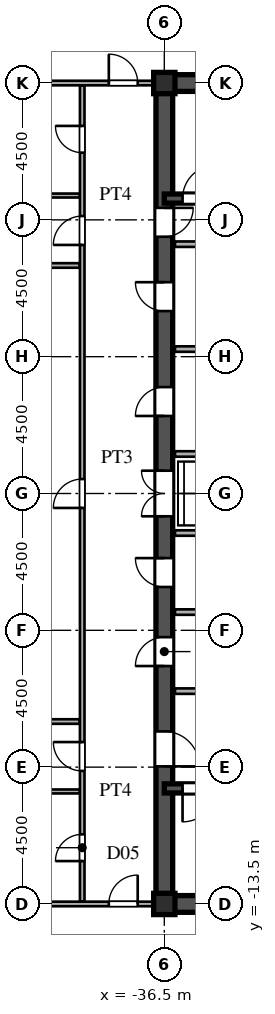
"""IFC4 building model, lengths in metres.
Left out: names, types, materials, properties, quantities, classifications, styles, units other than length and angle.
Written with IfcOpenShell. Run it as: python <this file> out.ifc"""

import sys

from ifc_helpers import new_model, si_unit, direction, frame, frame_2d, origin, origin_2d, place, context, subcontext, project, spatial, rectangle, i_section, extrude, source, transform, mapped, element, fill, save


model = new_model("IFC4")
c1 = context("Model", 3, precision=1e-05, world=origin(), true_north=direction((0.0, 1.0)))
c2 = subcontext(c1, "Body", "Model", "MODEL_VIEW")
j1 = project(units=[si_unit("LENGTHUNIT", "METRE"), si_unit("PLANEANGLEUNIT", "RADIAN")], contexts=[c1])
p1 = place(None, origin())
s1 = spatial("IfcSite", under=j1, at=p1, CompositionType="ELEMENT")
p2 = place(p1, origin())
s2 = spatial("IfcBuilding", under=s1, at=p2, CompositionType="ELEMENT")
p3 = place(p2, frame((0.0, 0.0, 135.6)))
s3 = spatial("IfcBuildingStorey", under=s2, at=p3, CompositionType="ELEMENT", Elevation=135.6)
m1 = source(origin(), c2, "Body", "SweptSolid", [
    extrude(i_section(OverallWidth=0.7, OverallDepth=0.7, WebThickness=0.028, FlangeThickness=0.045, at=origin_2d()), origin(), (0.0, 0.0, 1.0), 4.8),
])
for number, where, z_axis, x_axis in (
    (1, (-36.5, -13.5, 0.0), (0.0, 0.0, 1.0), (1.0, 0.0, 0.0)),
    (2, (-36.5, 13.5, 0.0), (0.0, 0.0, 1.0), (1.0, 0.0, 0.0)),
):
    element("IfcColumn", number, at=place(p3, frame(where, z_axis=z_axis, x_axis=x_axis)), inside=s3, PredefinedType="COLUMN", context=c2, shape_type="MappedRepresentation", body=[
        mapped(m1, transform((0.0, 0.0, 0.0), scale=1.0)),
    ])
for number, where, z_axis, x_axis in (
    (3, (-36.5, -13.5, 0.0), (0.0, 0.0, 1.0), (1.0, 0.0, 0.0)),
    (4, (-36.5, 13.5, 0.0), (0.0, 0.0, 1.0), (1.0, 0.0, 0.0)),
):
    element("IfcWall", number, at=place(p3, frame(where, z_axis=z_axis, x_axis=x_axis)), inside=s3, PredefinedType="SHEAR", context=c2, shape_type="SweptSolid", body=[
        extrude(rectangle(XDim=9.0, YDim=0.55, at=frame_2d((4.5, 0.0))), origin(), (0.0, 0.0, 1.0), 4.58),
    ])
p4 = place(p3, frame((-36.5, -13.65, 0.0), z_axis=(0.0, 0.0, 1.0), x_axis=(0.0, 1.0, 0.0)))
e5 = element("IfcWall", 5, at=p4, inside=s3, PredefinedType="SHEAR", context=c2, shape_type="SweptSolid", body=[
    extrude(rectangle(XDim=7.15, YDim=0.55, at=frame_2d((3.575, 0.0))), origin(), (0.0, 0.0, 1.0), 4.58),
])
p5 = place(p4, frame((4.675, 0.0, 0.0)))
e6 = element("IfcOpeningElement", 6, at=p5, cuts=e5, PredefinedType="OPENING", context=c2, shape_type="SweptSolid", body=[
    extrude(rectangle(XDim=1.15, YDim=2.2, at=frame_2d((0.575, 1.1))), frame((0.0, 0.285, 0.0), z_axis=(0.0, -1.0, 0.0), x_axis=(1.0, 0.0, 0.0)), (0.0, 0.0, 1.0), 0.57),
])
p6 = place(p3, frame((-36.5, -1.3, 0.0), z_axis=(0.0, 0.0, 1.0), x_axis=(0.0, 1.0, 0.0)))
e7 = element("IfcWall", 7, at=p6, inside=s3, PredefinedType="SHEAR", context=c2, shape_type="SweptSolid", body=[
    extrude(rectangle(XDim=2.6, YDim=0.55, at=frame_2d((1.3, 0.0))), origin(), (0.0, 0.0, 1.0), 4.58),
])
p7 = place(p6, frame((0.55, 0.0, 0.0)))
e8 = element("IfcOpeningElement", 8, at=p7, cuts=e7, PredefinedType="OPENING", context=c2, shape_type="SweptSolid", body=[
    extrude(rectangle(XDim=1.5, YDim=2.3, at=frame_2d((0.75, 1.15))), frame((0.0, 0.285, 0.0), z_axis=(0.0, -1.0, 0.0), x_axis=(1.0, 0.0, 0.0)), (0.0, 0.0, 1.0), 0.57),
])
p8 = place(p3, frame((-36.5, 8.2, 0.0), z_axis=(0.0, 0.0, 1.0), x_axis=(0.0, 1.0, 0.0)))
e9 = element("IfcWall", 9, at=p8, inside=s3, PredefinedType="SHEAR", context=c2, shape_type="SweptSolid", body=[
    extrude(rectangle(XDim=5.45, YDim=0.55, at=frame_2d((2.725, 0.0))), origin(), (0.0, 0.0, 1.0), 4.58),
])
p9 = place(p8, frame((0.245, 0.0, 0.0)))
e10 = element("IfcOpeningElement", 10, at=p9, cuts=e9, PredefinedType="OPENING", context=c2, shape_type="SweptSolid", body=[
    extrude(rectangle(XDim=0.95, YDim=2.15, at=frame_2d((0.475, 1.075))), frame((0.0, 0.285, 0.0), z_axis=(0.0, -1.0, 0.0), x_axis=(1.0, 0.0, 0.0)), (0.0, 0.0, 1.0), 0.57),
])
p10 = place(p3, frame((-36.5, -6.5, 0.0), z_axis=(0.0, 0.0, 1.0), x_axis=(0.0, 1.0, 0.0)))
e11 = element("IfcWall", 11, at=p10, inside=s3, PredefinedType="SHEAR", context=c2, shape_type="SweptSolid", body=[
    extrude(rectangle(XDim=2.6, YDim=0.55, at=frame_2d((1.3, 0.0))), origin(), (0.0, 0.0, 1.0), 4.58),
])
p11 = place(p10, frame((0.825, 0.0, 0.0)))
e12 = element("IfcOpeningElement", 12, at=p11, cuts=e11, PredefinedType="OPENING", context=c2, shape_type="SweptSolid", body=[
    extrude(rectangle(XDim=0.95, YDim=2.15, at=frame_2d((0.475, 1.075))), frame((0.0, 0.285, 0.0), z_axis=(0.0, -1.0, 0.0), x_axis=(1.0, 0.0, 0.0)), (0.0, 0.0, 1.0), 0.57),
])
p12 = place(p3, frame((-36.5, -3.9, 0.0), z_axis=(0.0, 0.0, 1.0), x_axis=(0.0, 1.0, 0.0)))
e13 = element("IfcWall", 13, at=p12, inside=s3, PredefinedType="SHEAR", context=c2, shape_type="SweptSolid", body=[
    extrude(rectangle(XDim=2.6, YDim=0.55, at=frame_2d((1.3, 0.0))), origin(), (0.0, 0.0, 1.0), 4.58),
])
p13 = place(p12, frame((0.825, 0.0, 0.0)))
e14 = element("IfcOpeningElement", 14, at=p13, cuts=e13, PredefinedType="OPENING", context=c2, shape_type="SweptSolid", body=[
    extrude(rectangle(XDim=0.95, YDim=2.15, at=frame_2d((0.475, 1.075))), frame((0.0, 0.285, 0.0), z_axis=(0.0, -1.0, 0.0), x_axis=(1.0, 0.0, 0.0)), (0.0, 0.0, 1.0), 0.57),
])
p14 = place(p3, frame((-36.5, 1.3, 0.0), z_axis=(0.0, 0.0, 1.0), x_axis=(0.0, 1.0, 0.0)))
e15 = element("IfcWall", 15, at=p14, inside=s3, PredefinedType="SHEAR", context=c2, shape_type="SweptSolid", body=[
    extrude(rectangle(XDim=3.45, YDim=0.55, at=frame_2d((1.725, 0.0))), origin(), (0.0, 0.0, 1.0), 4.58),
])
p15 = place(p14, frame((1.25, 0.0, 0.0)))
e16 = element("IfcOpeningElement", 16, at=p15, cuts=e15, PredefinedType="OPENING", context=c2, shape_type="SweptSolid", body=[
    extrude(rectangle(XDim=0.95, YDim=2.15, at=frame_2d((0.475, 1.075))), frame((0.0, 0.285, 0.0), z_axis=(0.0, -1.0, 0.0), x_axis=(1.0, 0.0, 0.0)), (0.0, 0.0, 1.0), 0.57),
])
p16 = place(p3, frame((-36.5, 4.75, 0.0), z_axis=(0.0, 0.0, 1.0), x_axis=(0.0, 1.0, 0.0)))
e17 = element("IfcWall", 17, at=p16, inside=s3, PredefinedType="SHEAR", context=c2, shape_type="SweptSolid", body=[
    extrude(rectangle(XDim=3.45, YDim=0.55, at=frame_2d((1.725, 0.0))), origin(), (0.0, 0.0, 1.0), 4.58),
])
p17 = place(p16, frame((1.25, 0.0, 0.0)))
e18 = element("IfcOpeningElement", 18, at=p17, cuts=e17, PredefinedType="OPENING", context=c2, shape_type="SweptSolid", body=[
    extrude(rectangle(XDim=0.95, YDim=2.15, at=frame_2d((0.475, 1.075))), frame((0.0, 0.285, 0.0), z_axis=(0.0, -1.0, 0.0), x_axis=(1.0, 0.0, 0.0)), (0.0, 0.0, 1.0), 0.57),
])
p18 = place(p3, frame((-36.5, -9.7, 0.0), z_axis=(0.0, 0.0, 1.0), x_axis=(1.0, 0.0, 0.0)))
e19 = element("IfcWall", 19, at=p18, inside=s3, PredefinedType="SHEAR", context=c2, shape_type="SweptSolid", body=[
    extrude(rectangle(XDim=9.0, YDim=0.3, at=frame_2d((4.5, 0.0))), origin(), (0.0, 0.0, 1.0), 4.58),
])
p19 = place(p18, frame((0.6, 0.0, 0.0)))
e20 = element("IfcOpeningElement", 20, at=p19, cuts=e19, PredefinedType="OPENING", context=c2, shape_type="SweptSolid", body=[
    extrude(rectangle(XDim=1.1, YDim=2.2, at=frame_2d((0.55, 1.1))), frame((0.0, 0.16, 0.0), z_axis=(0.0, -1.0, 0.0), x_axis=(1.0, 0.0, 0.0)), (0.0, 0.0, 1.0), 0.32),
])
p20 = place(p3, frame((-36.5, 9.7, 0.0), z_axis=(0.0, 0.0, 1.0), x_axis=(1.0, 0.0, 0.0)))
e21 = element("IfcWall", 21, at=p20, inside=s3, PredefinedType="SHEAR", context=c2, shape_type="SweptSolid", body=[
    extrude(rectangle(XDim=9.0, YDim=0.3, at=frame_2d((4.5, 0.0))), origin(), (0.0, 0.0, 1.0), 4.58),
])
p21 = place(p20, frame((0.6, 0.0, 0.0)))
e22 = element("IfcOpeningElement", 22, at=p21, cuts=e21, PredefinedType="OPENING", context=c2, shape_type="SweptSolid", body=[
    extrude(rectangle(XDim=1.1, YDim=2.2, at=frame_2d((0.55, 1.1))), frame((0.0, 0.16, 0.0), z_axis=(0.0, -1.0, 0.0), x_axis=(1.0, 0.0, 0.0)), (0.0, 0.0, 1.0), 0.32),
])
for number, where, z_axis, x_axis in (
    (23, (-36.15, -6.5, 0.0), (0.0, 0.0, 1.0), (1.0, 0.0, 0.0)),
    (24, (-36.15, 8.2, 0.0), (0.0, 0.0, 1.0), (1.0, 0.0, 0.0)),
):
    element("IfcWall", number, at=place(p3, frame(where, z_axis=z_axis, x_axis=x_axis)), inside=s3, PredefinedType="PARTITIONING", context=c2, shape_type="SweptSolid", body=[
        extrude(rectangle(XDim=5.7, YDim=0.18, at=frame_2d((2.85, 0.0))), origin(), (0.0, 0.0, 1.0), 4.58),
    ])
for number, where, z_axis, x_axis in (
    (25, (-36.15, -1.3, 0.0), (0.0, 0.0, 1.0), (1.0, 0.0, 0.0)),
    (26, (-36.15, 1.3, 0.0), (0.0, 0.0, 1.0), (1.0, 0.0, 0.0)),
    (27, (-36.15, -3.9, 0.0), (0.0, 0.0, 1.0), (1.0, 0.0, 0.0)),
    (28, (-36.15, 4.75, 0.0), (0.0, 0.0, 1.0), (1.0, 0.0, 0.0)),
):
    element("IfcWall", number, at=place(p3, frame(where, z_axis=z_axis, x_axis=x_axis)), inside=s3, PredefinedType="PARTITIONING", context=c2, shape_type="SweptSolid", body=[
        extrude(rectangle(XDim=2.95, YDim=0.18, at=frame_2d((1.475, 0.0))), origin(), (0.0, 0.0, 1.0), 4.58),
    ])
p22 = place(p3, frame((-52.947, -13.5, 0.0), z_axis=(0.0, 0.0, 1.0), x_axis=(1.0, 0.0, 0.0)))
e29 = element("IfcWall", 29, at=p22, inside=s3, PredefinedType="PARTITIONING", context=c2, shape_type="SweptSolid", body=[
    extrude(rectangle(XDim=16.167, YDim=0.15, at=frame_2d((8.083, 0.0))), origin(), (0.0, 0.0, 1.0), 3.98),
])
p23 = place(p22, frame((14.622, 0.0, 0.0)))
e30 = element("IfcOpeningElement", 30, at=p23, cuts=e29, PredefinedType="OPENING", context=c2, shape_type="SweptSolid", body=[
    extrude(rectangle(XDim=0.95, YDim=2.15, at=frame_2d((0.475, 1.075))), frame((0.0, 0.085, 0.0), z_axis=(0.0, -1.0, 0.0), x_axis=(1.0, 0.0, 0.0)), (0.0, 0.0, 1.0), 0.17),
])
p24 = place(p3, frame((-43.415, -9.8, 0.0), z_axis=(0.0, 0.0, 1.0), x_axis=(1.0, 0.0, 0.0)))
e31 = element("IfcWall", 31, at=p24, inside=s3, PredefinedType="PARTITIONING", context=c2, shape_type="SweptSolid", body=[
    extrude(rectangle(XDim=4.13, YDim=0.13, at=frame_2d((2.065, 0.0))), origin(), (0.0, 0.0, 1.0), 4.58),
])
p25 = place(p3, frame((-64.639, -7.5, 0.0), z_axis=(0.0, 0.0, 1.0), x_axis=(1.0, 0.0, 0.0)))
e32 = element("IfcWall", 32, at=p25, inside=s3, PredefinedType="PARTITIONING", context=c2, shape_type="SweptSolid", body=[
    extrude(rectangle(XDim=25.354, YDim=0.15, at=frame_2d((12.677, 0.0))), origin(), (0.0, 0.0, 1.0), 4.58),
])
p26 = place(p25, frame((14.914, 0.0, 0.0)))
e33 = element("IfcOpeningElement", 33, at=p26, cuts=e32, PredefinedType="OPENING", context=c2, shape_type="SweptSolid", body=[
    extrude(rectangle(XDim=0.95, YDim=2.15, at=frame_2d((0.475, 1.075))), frame((0.0, 0.085, 0.0), z_axis=(0.0, -1.0, 0.0), x_axis=(1.0, 0.0, 0.0)), (0.0, 0.0, 1.0), 0.17),
])
p27 = place(p3, frame((-64.639, 7.5, 0.0), z_axis=(0.0, 0.0, 1.0), x_axis=(1.0, 0.0, 0.0)))
e34 = element("IfcWall", 34, at=p27, inside=s3, PredefinedType="PARTITIONING", context=c2, shape_type="SweptSolid", body=[
    extrude(rectangle(XDim=25.354, YDim=0.15, at=frame_2d((12.677, 0.0))), origin(), (0.0, 0.0, 1.0), 4.58),
])
p28 = place(p27, frame((14.914, 0.0, 0.0)))
e35 = element("IfcOpeningElement", 35, at=p28, cuts=e34, PredefinedType="OPENING", context=c2, shape_type="SweptSolid", body=[
    extrude(rectangle(XDim=0.95, YDim=2.15, at=frame_2d((0.475, 1.075))), frame((0.0, 0.085, 0.0), z_axis=(0.0, -1.0, 0.0), x_axis=(1.0, 0.0, 0.0)), (0.0, 0.0, 1.0), 0.17),
])
p29 = place(p3, frame((-43.415, 9.8, 0.0), z_axis=(0.0, 0.0, 1.0), x_axis=(1.0, 0.0, 0.0)))
e36 = element("IfcWall", 36, at=p29, inside=s3, PredefinedType="PARTITIONING", context=c2, shape_type="SweptSolid", body=[
    extrude(rectangle(XDim=4.13, YDim=0.13, at=frame_2d((2.065, 0.0))), origin(), (0.0, 0.0, 1.0), 4.58),
])
p30 = place(p3, frame((-52.947, 13.5, 0.0), z_axis=(0.0, 0.0, 1.0), x_axis=(1.0, 0.0, 0.0)))
e37 = element("IfcWall", 37, at=p30, inside=s3, PredefinedType="PARTITIONING", context=c2, shape_type="SweptSolid", body=[
    extrude(rectangle(XDim=16.167, YDim=0.15, at=frame_2d((8.083, 0.0))), origin(), (0.0, 0.0, 1.0), 3.98),
])
p31 = place(p30, frame((14.622, 0.0, 0.0)))
e38 = element("IfcOpeningElement", 38, at=p31, cuts=e37, PredefinedType="OPENING", context=c2, shape_type="SweptSolid", body=[
    extrude(rectangle(XDim=0.95, YDim=2.15, at=frame_2d((0.475, 1.075))), frame((0.0, 0.085, 0.0), z_axis=(0.0, -1.0, 0.0), x_axis=(1.0, 0.0, 0.0)), (0.0, 0.0, 1.0), 0.17),
])
p32 = place(p3, frame((-39.2, -13.415, 0.0), z_axis=(0.0, 0.0, 1.0), x_axis=(0.0, 1.0, 0.0)))
e39 = element("IfcWall", 39, at=p32, inside=s3, PredefinedType="PARTITIONING", context=c2, shape_type="SweptSolid", body=[
    extrude(rectangle(XDim=26.83, YDim=0.15, at=frame_2d((13.415, 0.0))), origin(), (0.0, 0.0, 1.0), 4.58),
])
p33 = place(p32, frame((12.94, 0.0, 0.0)))
e40 = element("IfcOpeningElement", 40, at=p33, cuts=e39, PredefinedType="OPENING", context=c2, shape_type="SweptSolid", body=[
    extrude(rectangle(XDim=0.95, YDim=2.15, at=frame_2d((0.475, 1.075))), frame((0.0, 0.085, 0.0), z_axis=(0.0, -1.0, 0.0), x_axis=(1.0, 0.0, 0.0)), (0.0, 0.0, 1.0), 0.17),
])
p34 = place(p32, frame((1.325, 0.0, 0.0)))
e41 = element("IfcOpeningElement", 41, at=p34, cuts=e39, PredefinedType="OPENING", context=c2, shape_type="SweptSolid", body=[
    extrude(rectangle(XDim=0.88, YDim=2.1, at=frame_2d((0.44, 1.05))), frame((0.0, 0.085, 0.0), z_axis=(0.0, -1.0, 0.0), x_axis=(1.0, 0.0, 0.0)), (0.0, 0.0, 1.0), 0.17),
])
p35 = place(p32, frame((4.29, 0.0, 0.0)))
e42 = element("IfcOpeningElement", 42, at=p35, cuts=e39, PredefinedType="OPENING", context=c2, shape_type="SweptSolid", body=[
    extrude(rectangle(XDim=0.95, YDim=2.15, at=frame_2d((0.475, 1.075))), frame((0.0, 0.085, 0.0), z_axis=(0.0, -1.0, 0.0), x_axis=(1.0, 0.0, 0.0)), (0.0, 0.0, 1.0), 0.17),
])
p36 = place(p32, frame((21.59, 0.0, 0.0)))
e43 = element("IfcOpeningElement", 43, at=p36, cuts=e39, PredefinedType="OPENING", context=c2, shape_type="SweptSolid", body=[
    extrude(rectangle(XDim=0.95, YDim=2.15, at=frame_2d((0.475, 1.075))), frame((0.0, 0.085, 0.0), z_axis=(0.0, -1.0, 0.0), x_axis=(1.0, 0.0, 0.0)), (0.0, 0.0, 1.0), 0.17),
])
p37 = place(p32, frame((24.625, 0.0, 0.0)))
e44 = element("IfcOpeningElement", 44, at=p37, cuts=e39, PredefinedType="OPENING", context=c2, shape_type="SweptSolid", body=[
    extrude(rectangle(XDim=0.88, YDim=2.1, at=frame_2d((0.44, 1.05))), frame((0.0, 0.085, 0.0), z_axis=(0.0, -1.0, 0.0), x_axis=(1.0, 0.0, 0.0)), (0.0, 0.0, 1.0), 0.17),
])
m2 = source(origin(), c2, "Body", "SweptSolid", [
    extrude(rectangle(XDim=1.15, YDim=2.2, at=frame_2d((0.575, 1.1))), frame((0.0, 0.025, 0.0), z_axis=(0.0, -1.0, 0.0), x_axis=(1.0, 0.0, 0.0)), (0.0, 0.0, 1.0), 0.05),
])
p38 = place(p5, frame((1.15, 0.0, 0.0), z_axis=(0.0, 0.0, 1.0), x_axis=(-1.0, 0.0, 0.0)))
e45 = element("IfcDoor", 45, at=p38, inside=s3, OperationType="SINGLE_SWING_LEFT", PredefinedType="DOOR", context=c2, shape_type="MappedRepresentation", body=[
    mapped(m2, transform((0.0, 0.0, 0.0), scale=1.0)),
])
fill(e6, e45)
m3 = source(origin(), c2, "Body", "SweptSolid", [
    extrude(rectangle(XDim=1.5, YDim=2.3, at=frame_2d((0.75, 1.15))), frame((0.0, 0.025, 0.0), z_axis=(0.0, -1.0, 0.0), x_axis=(1.0, 0.0, 0.0)), (0.0, 0.0, 1.0), 0.05),
])
p39 = place(p7, origin())
e46 = element("IfcDoor", 46, at=p39, inside=s3, OperationType="DOUBLE_SWING_LEFT", PredefinedType="DOOR", context=c2, shape_type="MappedRepresentation", body=[
    mapped(m3, transform((0.0, 0.0, 0.0), scale=1.0)),
])
fill(e8, e46)
m4 = source(origin(), c2, "Body", "SweptSolid", [
    extrude(rectangle(XDim=0.95, YDim=2.15, at=frame_2d((0.475, 1.075))), frame((0.0, 0.025, 0.0), z_axis=(0.0, -1.0, 0.0), x_axis=(1.0, 0.0, 0.0)), (0.0, 0.0, 1.0), 0.05),
])
p40 = place(p9, frame((0.95, 0.0, 0.0), z_axis=(0.0, 0.0, 1.0), x_axis=(-1.0, 0.0, 0.0)))
e47 = element("IfcDoor", 47, at=p40, inside=s3, OperationType="SINGLE_SWING_RIGHT", PredefinedType="DOOR", context=c2, shape_type="MappedRepresentation", body=[
    mapped(m4, transform((0.0, 0.0, 0.0), scale=1.0)),
])
fill(e10, e47)
p41 = place(p11, origin())
e48 = element("IfcDoor", 48, at=p41, inside=s3, OperationType="SINGLE_SWING_LEFT", PredefinedType="DOOR", context=c2, shape_type="MappedRepresentation", body=[
    mapped(m4, transform((0.0, 0.0, 0.0), scale=1.0)),
])
fill(e12, e48)
p42 = place(p13, origin())
e49 = element("IfcDoor", 49, at=p42, inside=s3, OperationType="SINGLE_SWING_RIGHT", PredefinedType="DOOR", context=c2, shape_type="MappedRepresentation", body=[
    mapped(m4, transform((0.0, 0.0, 0.0), scale=1.0)),
])
fill(e14, e49)
p43 = place(p15, origin())
e50 = element("IfcDoor", 50, at=p43, inside=s3, OperationType="SINGLE_SWING_LEFT", PredefinedType="DOOR", context=c2, shape_type="MappedRepresentation", body=[
    mapped(m4, transform((0.0, 0.0, 0.0), scale=1.0)),
])
fill(e16, e50)
p44 = place(p17, origin())
e51 = element("IfcDoor", 51, at=p44, inside=s3, OperationType="SINGLE_SWING_RIGHT", PredefinedType="DOOR", context=c2, shape_type="MappedRepresentation", body=[
    mapped(m4, transform((0.0, 0.0, 0.0), scale=1.0)),
])
fill(e18, e51)
m5 = source(origin(), c2, "Body", "SweptSolid", [
    extrude(rectangle(XDim=1.1, YDim=2.2, at=frame_2d((0.55, 1.1))), frame((0.0, 0.025, 0.0), z_axis=(0.0, -1.0, 0.0), x_axis=(1.0, 0.0, 0.0)), (0.0, 0.0, 1.0), 0.05),
])
p45 = place(p19, frame((1.1, 0.0, 0.0), z_axis=(0.0, 0.0, 1.0), x_axis=(-1.0, 0.0, 0.0)))
e52 = element("IfcDoor", 52, at=p45, inside=s3, OperationType="SINGLE_SWING_LEFT", PredefinedType="DOOR", context=c2, shape_type="MappedRepresentation", body=[
    mapped(m5, transform((0.0, 0.0, 0.0), scale=1.0)),
])
fill(e20, e52)
p46 = place(p21, origin())
e53 = element("IfcDoor", 53, at=p46, inside=s3, OperationType="SINGLE_SWING_RIGHT", PredefinedType="DOOR", context=c2, shape_type="MappedRepresentation", body=[
    mapped(m5, transform((0.0, 0.0, 0.0), scale=1.0)),
])
fill(e22, e53)
m6 = source(origin(), c2, "Body", "SweptSolid", [
    extrude(rectangle(XDim=0.95, YDim=2.15, at=frame_2d((0.475, 1.075))), frame((0.0, 0.025, 0.0), z_axis=(0.0, -1.0, 0.0), x_axis=(1.0, 0.0, 0.0)), (0.0, 0.0, 1.0), 0.05),
])
p47 = place(p23, origin())
e54 = element("IfcDoor", 54, at=p47, inside=s3, OperationType="SINGLE_SWING_RIGHT", PredefinedType="DOOR", context=c2, shape_type="MappedRepresentation", body=[
    mapped(m6, transform((0.0, 0.0, 0.0), scale=1.0)),
])
fill(e30, e54)
p48 = place(p31, origin())
e55 = element("IfcDoor", 55, at=p48, inside=s3, OperationType="SINGLE_SWING_LEFT", PredefinedType="DOOR", context=c2, shape_type="MappedRepresentation", body=[
    mapped(m6, transform((0.0, 0.0, 0.0), scale=1.0)),
])
fill(e38, e55)
p49 = place(p33, origin())
e56 = element("IfcDoor", 56, at=p49, inside=s3, OperationType="SINGLE_SWING_LEFT", PredefinedType="DOOR", context=c2, shape_type="MappedRepresentation", body=[
    mapped(m6, transform((0.0, 0.0, 0.0), scale=1.0)),
])
fill(e40, e56)
m7 = source(origin(), c2, "Body", "SweptSolid", [
    extrude(rectangle(XDim=0.88, YDim=2.1, at=frame_2d((0.44, 1.05))), frame((0.0, 0.025, 0.0), z_axis=(0.0, -1.0, 0.0), x_axis=(1.0, 0.0, 0.0)), (0.0, 0.0, 1.0), 0.05),
])
p50 = place(p34, origin())
e57 = element("IfcDoor", 57, at=p50, inside=s3, OperationType="SINGLE_SWING_LEFT", PredefinedType="DOOR", context=c2, shape_type="MappedRepresentation", body=[
    mapped(m7, transform((0.0, 0.0, 0.0), scale=1.0)),
])
fill(e41, e57)
p51 = place(p35, origin())
e58 = element("IfcDoor", 58, at=p51, inside=s3, OperationType="SINGLE_SWING_RIGHT", PredefinedType="DOOR", context=c2, shape_type="MappedRepresentation", body=[
    mapped(m6, transform((0.0, 0.0, 0.0), scale=1.0)),
])
fill(e42, e58)
p52 = place(p36, origin())
e59 = element("IfcDoor", 59, at=p52, inside=s3, OperationType="SINGLE_SWING_LEFT", PredefinedType="DOOR", context=c2, shape_type="MappedRepresentation", body=[
    mapped(m6, transform((0.0, 0.0, 0.0), scale=1.0)),
])
fill(e43, e59)
p53 = place(p37, origin())
e60 = element("IfcDoor", 60, at=p53, inside=s3, OperationType="SINGLE_SWING_RIGHT", PredefinedType="DOOR", context=c2, shape_type="MappedRepresentation", body=[
    mapped(m7, transform((0.0, 0.0, 0.0), scale=1.0)),
])
fill(e44, e60)
save(model, sys.argv[1])
